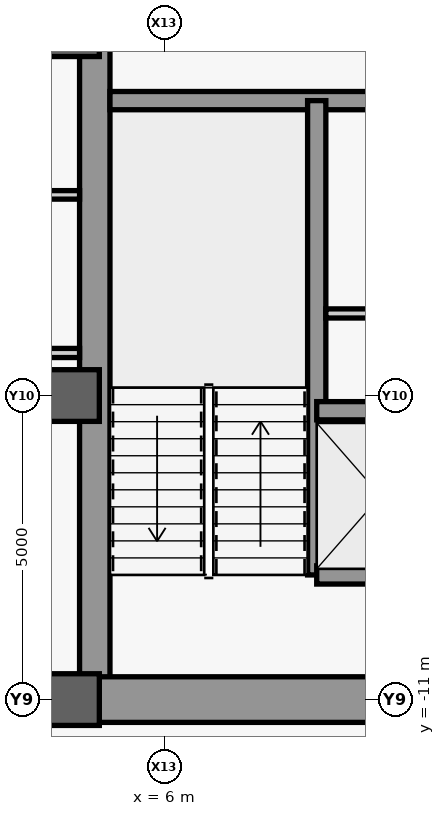
"""IFC4 building model, lengths in metres.
Left out: names, types, materials, properties, quantities, classifications, styles, units other than length and angle.
Written with IfcOpenShell. Run it as: python <this file> out.ifc"""

import sys

from ifc_helpers import new_model, si_unit, direction, frame, frame_2d, origin, origin_2d, place, context, subcontext, project, spatial, rectangle, extrude, source, transform, mapped, element, save


model = new_model("IFC4")
c1 = context("Model", 3, precision=1e-05, world=origin(), true_north=direction((0.0, 1.0)))
c2 = subcontext(c1, "Body", "Model", "MODEL_VIEW")
j1 = project(units=[si_unit("LENGTHUNIT", "METRE"), si_unit("PLANEANGLEUNIT", "RADIAN")], contexts=[c1])
p1 = place(None, origin())
s1 = spatial("IfcSite", under=j1, at=p1, CompositionType="ELEMENT")
p2 = place(p1, origin())
s2 = spatial("IfcBuilding", under=s1, at=p2, CompositionType="ELEMENT")
p3 = place(p2, frame((0.0, 0.0, 207.1)))
s3 = spatial("IfcBuildingStorey", under=s2, at=p3, CompositionType="ELEMENT", Elevation=207.1)
m1 = source(origin(), c2, "Body", "SweptSolid", [
    extrude(rectangle(XDim=21.4, YDim=0.5, at=frame_2d((10.7, 0.0))), origin(), (0.0, 0.0, 1.0), 3.78),
])
p4 = place(p3, frame((4.85, -10.7, 0.0), z_axis=(0.0, 0.0, 1.0), x_axis=(0.0, 1.0, 0.0)))
e1 = element("IfcWall", 1, at=p4, inside=s3, PredefinedType="SHEAR", context=c2, shape_type="MappedRepresentation", body=[
    mapped(m1, transform((0.0, 0.0, 0.0), scale=1.0)),
])
m2 = source(origin(), c2, "Body", "SweptSolid", [
    extrude(rectangle(XDim=5.85, YDim=0.75, at=frame_2d((2.925, 0.0))), origin(), (0.0, 0.0, 1.0), 3.78),
])
p5 = place(p3, frame((4.85, -11.0, 0.0), z_axis=(0.0, 0.0, 1.0), x_axis=(1.0, 0.0, 0.0)))
e2 = element("IfcWall", 2, at=p5, inside=s3, PredefinedType="SHEAR", context=c2, shape_type="MappedRepresentation", body=[
    mapped(m2, transform((0.0, 0.0, 0.0), scale=1.0)),
])
m3 = source(origin(), c2, "Body", "SweptSolid", [
    extrude(rectangle(XDim=5.6, YDim=0.3, at=frame_2d((2.8, 0.0))), origin(), (0.0, 0.0, 1.0), 3.78),
])
p6 = place(p3, frame((5.1, -1.15, 0.0), z_axis=(0.0, 0.0, 1.0), x_axis=(1.0, 0.0, 0.0)))
e3 = element("IfcWall", 3, at=p6, inside=s3, PredefinedType="SHEAR", context=c2, shape_type="MappedRepresentation", body=[
    mapped(m3, transform((0.0, 0.0, 0.0), scale=1.0)),
])
m4 = source(origin(), c2, "Body", "SweptSolid", [
    extrude(rectangle(XDim=9.2, YDim=0.5, at=frame_2d((4.6, 0.0))), origin(), (0.0, 0.0, 1.0), 3.78),
])
p7 = place(p3, frame((-4.6, -11.0, 0.0), z_axis=(0.0, 0.0, 1.0), x_axis=(1.0, 0.0, 0.0)))
e4 = element("IfcWall", 4, at=p7, inside=s3, PredefinedType="SHEAR", context=c2, shape_type="MappedRepresentation", body=[
    mapped(m4, transform((0.0, 0.0, 0.0), scale=1.0)),
])
m5 = source(origin(), c2, "Body", "SweptSolid", [
    extrude(rectangle(XDim=1.8, YDim=2.25, at=frame_2d((0.9, 1.125))), frame((0.0, 0.26, 0.0), z_axis=(0.0, -1.0, 0.0), x_axis=(1.0, 0.0, 0.0)), (0.0, 0.0, 1.0), 0.52),
])
p8 = place(p7, frame((3.7, 0.0, 0.0)))
e5 = element("IfcOpeningElement", 5, at=p8, cuts=e4, PredefinedType="OPENING", context=c2, shape_type="MappedRepresentation", body=[
    mapped(m5, transform((0.0, 0.0, 0.0), scale=1.0)),
])
m6 = source(origin(), c2, "Body", "SweptSolid", [
    extrude(rectangle(XDim=0.85, YDim=0.85, at=origin_2d()), origin(), (0.0, 0.0, 1.0), 4.0),
])
for number, where, z_axis, x_axis in (
    (6, (4.5, -11.0, 0.0), (0.0, 0.0, 1.0), (1.0, 0.0, 0.0)),
    (7, (4.5, -6.0, 0.0), (0.0, 0.0, 1.0), (1.0, 0.0, 0.0)),
    (8, (4.5, 0.0, 0.0), (0.0, 0.0, 1.0), (1.0, 0.0, 0.0)),
):
    element("IfcColumn", number, at=place(p3, frame(where, z_axis=z_axis, x_axis=x_axis)), inside=s3, PredefinedType="COLUMN", context=c2, shape_type="MappedRepresentation", body=[
        mapped(m6, transform((0.0, 0.0, 0.0), scale=1.0)),
    ])
m7 = source(origin(), c2, "Body", "SweptSolid", [
    extrude(rectangle(XDim=7.8, YDim=0.3, at=frame_2d((3.9, 0.0))), origin(), (0.0, 0.0, 1.0), 3.78),
])
p9 = place(p3, frame((8.5, -8.95, 0.0), z_axis=(0.0, 0.0, 1.0), x_axis=(0.0, 1.0, 0.0)))
e9 = element("IfcWall", 9, at=p9, inside=s3, PredefinedType="SHEAR", context=c2, shape_type="MappedRepresentation", body=[
    mapped(m7, transform((0.0, 0.0, 0.0), scale=1.0)),
])
m8 = source(origin(), c2, "Body", "SweptSolid", [
    extrude(rectangle(XDim=2.2, YDim=0.3, at=frame_2d((1.1, 0.0))), origin(), (0.0, 0.0, 1.0), 3.78),
])
for number, where, z_axis, x_axis in (
    (10, (8.5, -8.95, 0.0), (0.0, 0.0, 1.0), (1.0, 0.0, 0.0)),
    (11, (8.5, -6.25, 0.0), (0.0, 0.0, 1.0), (1.0, 0.0, 0.0)),
):
    element("IfcWall", number, at=place(p3, frame(where, z_axis=z_axis, x_axis=x_axis)), inside=s3, PredefinedType="SHEAR", context=c2, shape_type="MappedRepresentation", body=[
        mapped(m8, transform((0.0, 0.0, 0.0), scale=1.0)),
    ])
m9 = source(origin(), c2, "Body", "SweptSolid", [
    extrude(rectangle(XDim=2.05, YDim=0.15, at=frame_2d((1.025, 0.0))), origin(), (0.0, 0.0, 1.0), 3.78),
])
p10 = place(p3, frame((8.65, -4.65, 0.0), z_axis=(0.0, 0.0, 1.0), x_axis=(1.0, 0.0, 0.0)))
e12 = element("IfcWall", 12, at=p10, inside=s3, PredefinedType="PARTITIONING", context=c2, shape_type="MappedRepresentation", body=[
    mapped(m9, transform((0.0, 0.0, 0.0), scale=1.0)),
])
m10 = source(origin(), c2, "Body", "SweptSolid", [
    extrude(rectangle(XDim=3.45, YDim=0.15, at=frame_2d((1.725, 0.0))), origin(), (0.0, 0.0, 1.0), 3.78),
])
p11 = place(p3, frame((1.15, -5.3, 0.0), z_axis=(0.0, 0.0, 1.0), x_axis=(1.0, 0.0, 0.0)))
e13 = element("IfcWall", 13, at=p11, inside=s3, PredefinedType="PARTITIONING", context=c2, shape_type="MappedRepresentation", body=[
    mapped(m10, transform((0.0, 0.0, 0.0), scale=1.0)),
])
m11 = source(origin(), c2, "Body", "SweptSolid", [
    extrude(rectangle(XDim=3.45, YDim=0.14, at=frame_2d((1.725, 0.0))), origin(), (0.0, 0.0, 1.0), 3.78),
])
p12 = place(p3, frame((1.15, -2.7, 0.0), z_axis=(0.0, 0.0, 1.0), x_axis=(1.0, 0.0, 0.0)))
e14 = element("IfcWall", 14, at=p12, inside=s3, PredefinedType="PARTITIONING", context=c2, shape_type="MappedRepresentation", body=[
    mapped(m11, transform((0.0, 0.0, 0.0), scale=1.0)),
])
save(model, sys.argv[1])
